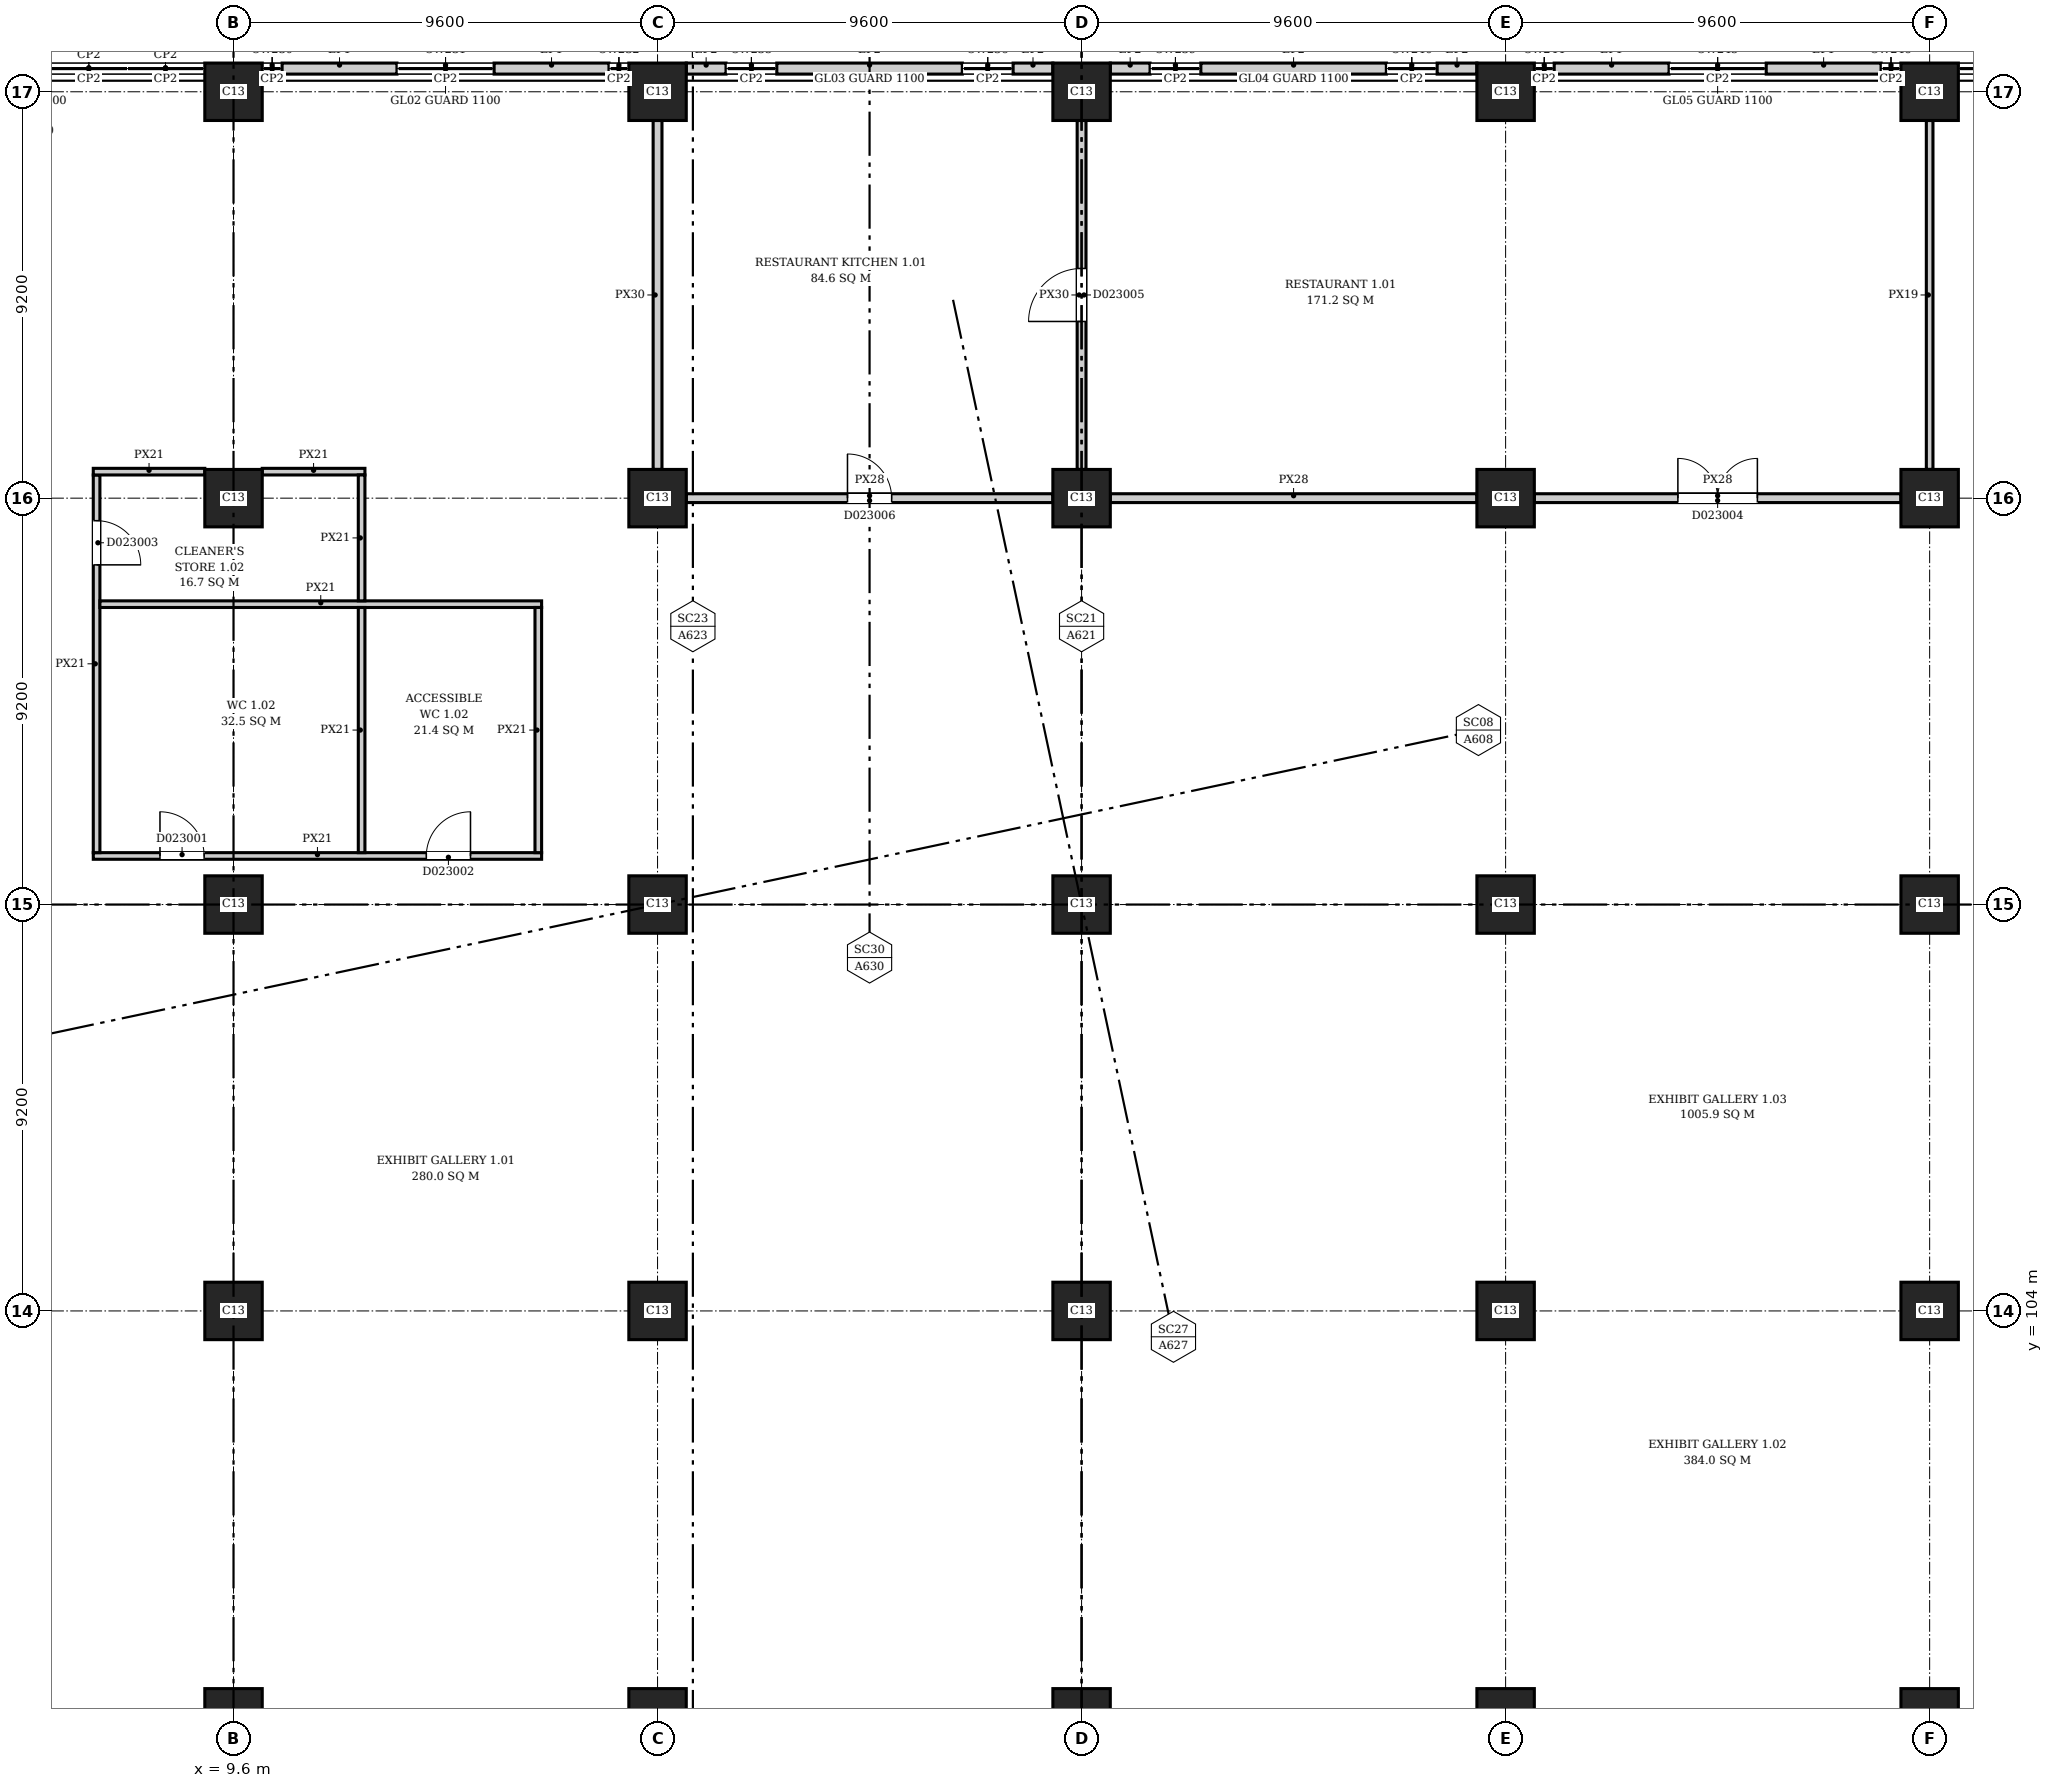
"""IFC4 building model, lengths in metres.
Left out: names, types, materials, properties, quantities, classifications, styles, units other than length and angle.
Written with IfcOpenShell. Run it as: python <this file> out.ifc"""

import sys

from ifc_helpers import new_model, si_unit, direction, frame, frame_2d, origin, origin_2d, place, context, subcontext, project, spatial, rectangle, extrude, element, fill, save


model = new_model("IFC4")
c1 = context("Model", 3, precision=1e-05, world=origin(), true_north=direction((0.0, 1.0)))
c2 = subcontext(c1, "Body", "Model", "MODEL_VIEW")
j1 = project(units=[si_unit("LENGTHUNIT", "METRE"), si_unit("PLANEANGLEUNIT", "RADIAN")], contexts=[c1])
p1 = place(None, origin())
s1 = spatial("IfcSite", under=j1, at=p1, CompositionType="ELEMENT")
p2 = place(p1, origin())
s2 = spatial("IfcBuilding", under=s1, at=p2, CompositionType="ELEMENT")
p3 = place(p2, frame((0.0, 0.0, 6.5)))
s3 = spatial("IfcBuildingStorey", under=s2, at=p3, CompositionType="ELEMENT", Elevation=6.5)
for number, where, z_axis, x_axis in (
    (1, (9.6, 94.8, 0.0), (0.0, 0.0, 1.0), (1.0, 0.0, 0.0)),
    (2, (19.2, 94.8, 0.0), (0.0, 0.0, 1.0), (1.0, 0.0, 0.0)),
    (3, (28.8, 94.8, 0.0), (0.0, 0.0, 1.0), (1.0, 0.0, 0.0)),
    (4, (38.4, 94.8, 0.0), (0.0, 0.0, 1.0), (1.0, 0.0, 0.0)),
    (5, (48.0, 94.8, 0.0), (0.0, 0.0, 1.0), (1.0, 0.0, 0.0)),
    (6, (9.6, 104.0, 0.0), (0.0, 0.0, 1.0), (1.0, 0.0, 0.0)),
    (7, (19.2, 104.0, 0.0), (0.0, 0.0, 1.0), (1.0, 0.0, 0.0)),
    (8, (28.8, 104.0, 0.0), (0.0, 0.0, 1.0), (1.0, 0.0, 0.0)),
    (9, (38.4, 104.0, 0.0), (0.0, 0.0, 1.0), (1.0, 0.0, 0.0)),
    (10, (48.0, 104.0, 0.0), (0.0, 0.0, 1.0), (1.0, 0.0, 0.0)),
    (11, (9.6, 113.2, 0.0), (0.0, 0.0, 1.0), (1.0, 0.0, 0.0)),
    (12, (19.2, 113.2, 0.0), (0.0, 0.0, 1.0), (1.0, 0.0, 0.0)),
    (13, (28.8, 113.2, 0.0), (0.0, 0.0, 1.0), (1.0, 0.0, 0.0)),
    (14, (38.4, 113.2, 0.0), (0.0, 0.0, 1.0), (1.0, 0.0, 0.0)),
    (15, (48.0, 113.2, 0.0), (0.0, 0.0, 1.0), (1.0, 0.0, 0.0)),
    (16, (9.6, 122.4, 0.0), (0.0, 0.0, 1.0), (1.0, 0.0, 0.0)),
    (17, (19.2, 122.4, 0.0), (0.0, 0.0, 1.0), (1.0, 0.0, 0.0)),
    (18, (28.8, 122.4, 0.0), (0.0, 0.0, 1.0), (1.0, 0.0, 0.0)),
    (19, (38.4, 122.4, 0.0), (0.0, 0.0, 1.0), (1.0, 0.0, 0.0)),
    (20, (48.0, 122.4, 0.0), (0.0, 0.0, 1.0), (1.0, 0.0, 0.0)),
    (21, (9.6, 131.6, 0.0), (0.0, 0.0, 1.0), (1.0, 0.0, 0.0)),
    (22, (19.2, 131.6, 0.0), (0.0, 0.0, 1.0), (1.0, 0.0, 0.0)),
    (23, (28.8, 131.6, 0.0), (0.0, 0.0, 1.0), (1.0, 0.0, 0.0)),
    (24, (38.4, 131.6, 0.0), (0.0, 0.0, 1.0), (1.0, 0.0, 0.0)),
    (25, (48.0, 131.6, 0.0), (0.0, 0.0, 1.0), (1.0, 0.0, 0.0)),
):
    element("IfcColumn", number, at=place(p3, frame(where, z_axis=z_axis, x_axis=x_axis)), inside=s3, PredefinedType="COLUMN", context=c2, shape_type="SweptSolid", body=[
        extrude(rectangle(XDim=1.3, YDim=1.3, at=origin_2d()), origin(), (0.0, 0.0, 1.0), 7.7),
    ])
for number, where, z_axis, x_axis in (
    (26, (13.3, 132.125, 0.0), (0.0, 0.0, 1.0), (-1.0, 0.0, 0.0)),
    (27, (18.1, 132.125, 0.0), (0.0, 0.0, 1.0), (-1.0, 0.0, 0.0)),
):
    element("IfcWall", number, at=place(p3, frame(where, z_axis=z_axis, x_axis=x_axis)), inside=s3, PredefinedType="ELEMENTEDWALL", context=c2, shape_type="SweptSolid", body=[
        extrude(rectangle(XDim=2.6, YDim=0.25, at=frame_2d((1.3, 0.0))), origin(), (0.0, 0.0, 1.0), 7.29),
    ])
p4 = place(p3, frame((20.75, 132.125, 0.0), z_axis=(0.0, 0.0, 1.0), x_axis=(-1.0, 0.0, 0.0)))
e28 = element("IfcWall", 28, at=p4, inside=s3, PredefinedType="ELEMENTEDWALL", context=c2, shape_type="SweptSolid", body=[
    extrude(rectangle(XDim=0.9, YDim=0.25, at=frame_2d((0.45, 0.0))), origin(), (0.0, 0.0, 1.0), 7.29),
])
p5 = place(p3, frame((26.1, 132.125, 0.0), z_axis=(0.0, 0.0, 1.0), x_axis=(-1.0, 0.0, 0.0)))
e29 = element("IfcWall", 29, at=p5, inside=s3, PredefinedType="ELEMENTEDWALL", context=c2, shape_type="SweptSolid", body=[
    extrude(rectangle(XDim=4.2, YDim=0.25, at=frame_2d((2.1, 0.0))), origin(), (0.0, 0.0, 1.0), 7.29),
])
p6 = place(p3, frame((28.15, 132.125, 0.0), z_axis=(0.0, 0.0, 1.0), x_axis=(-1.0, 0.0, 0.0)))
e30 = element("IfcWall", 30, at=p6, inside=s3, PredefinedType="ELEMENTEDWALL", context=c2, shape_type="SweptSolid", body=[
    extrude(rectangle(XDim=0.9, YDim=0.25, at=frame_2d((0.45, 0.0))), origin(), (0.0, 0.0, 1.0), 7.29),
])
p7 = place(p3, frame((30.35, 132.125, 0.0), z_axis=(0.0, 0.0, 1.0), x_axis=(-1.0, 0.0, 0.0)))
e31 = element("IfcWall", 31, at=p7, inside=s3, PredefinedType="ELEMENTEDWALL", context=c2, shape_type="SweptSolid", body=[
    extrude(rectangle(XDim=0.9, YDim=0.25, at=frame_2d((0.45, 0.0))), origin(), (0.0, 0.0, 1.0), 7.29),
])
p8 = place(p3, frame((35.7, 132.125, 0.0), z_axis=(0.0, 0.0, 1.0), x_axis=(-1.0, 0.0, 0.0)))
e32 = element("IfcWall", 32, at=p8, inside=s3, PredefinedType="ELEMENTEDWALL", context=c2, shape_type="SweptSolid", body=[
    extrude(rectangle(XDim=4.2, YDim=0.25, at=frame_2d((2.1, 0.0))), origin(), (0.0, 0.0, 1.0), 7.29),
])
p9 = place(p3, frame((37.75, 132.125, 0.0), z_axis=(0.0, 0.0, 1.0), x_axis=(-1.0, 0.0, 0.0)))
e33 = element("IfcWall", 33, at=p9, inside=s3, PredefinedType="ELEMENTEDWALL", context=c2, shape_type="SweptSolid", body=[
    extrude(rectangle(XDim=0.9, YDim=0.25, at=frame_2d((0.45, 0.0))), origin(), (0.0, 0.0, 1.0), 7.29),
])
p10 = place(p3, frame((42.1, 132.125, 0.0), z_axis=(0.0, 0.0, 1.0), x_axis=(-1.0, 0.0, 0.0)))
e34 = element("IfcWall", 34, at=p10, inside=s3, PredefinedType="ELEMENTEDWALL", context=c2, shape_type="SweptSolid", body=[
    extrude(rectangle(XDim=2.6, YDim=0.25, at=frame_2d((1.3, 0.0))), origin(), (0.0, 0.0, 1.0), 7.29),
])
p11 = place(p3, frame((46.9, 132.125, 0.0), z_axis=(0.0, 0.0, 1.0), x_axis=(-1.0, 0.0, 0.0)))
e35 = element("IfcWall", 35, at=p11, inside=s3, PredefinedType="ELEMENTEDWALL", context=c2, shape_type="SweptSolid", body=[
    extrude(rectangle(XDim=2.6, YDim=0.25, at=frame_2d((1.3, 0.0))), origin(), (0.0, 0.0, 1.0), 7.29),
])
p12 = place(p3, frame((6.425, 114.3, 0.0), z_axis=(0.0, 0.0, 1.0), x_axis=(1.0, 0.0, 0.0)))
e36 = element("IfcWall", 36, at=p12, inside=s3, PredefinedType="PARTITIONING", context=c2, shape_type="SweptSolid", body=[
    extrude(rectangle(XDim=10.15, YDim=0.15, at=frame_2d((5.075, 0.0))), origin(), (0.0, 0.0, 1.0), 7.29),
])
p13 = place(p12, frame((1.51, 0.0, 0.0)))
e37 = element("IfcOpeningElement", 37, at=p13, cuts=e36, PredefinedType="OPENING", context=c2, shape_type="SweptSolid", body=[
    extrude(rectangle(XDim=1.0, YDim=2.1, at=frame_2d((0.5, 1.05))), frame((0.0, 0.085, 0.0), z_axis=(0.0, -1.0, 0.0), x_axis=(1.0, 0.0, 0.0)), (0.0, 0.0, 1.0), 0.17),
])
p14 = place(p12, frame((7.54, 0.0, 0.0)))
e38 = element("IfcOpeningElement", 38, at=p14, cuts=e36, PredefinedType="OPENING", context=c2, shape_type="SweptSolid", body=[
    extrude(rectangle(XDim=1.0, YDim=2.1, at=frame_2d((0.5, 1.05))), frame((0.0, 0.085, 0.0), z_axis=(0.0, -1.0, 0.0), x_axis=(1.0, 0.0, 0.0)), (0.0, 0.0, 1.0), 0.17),
])
p15 = place(p3, frame((6.5, 114.375, 0.0), z_axis=(0.0, 0.0, 1.0), x_axis=(0.0, 1.0, 0.0)))
e39 = element("IfcWall", 39, at=p15, inside=s3, PredefinedType="PARTITIONING", context=c2, shape_type="SweptSolid", body=[
    extrude(rectangle(XDim=8.55, YDim=0.15, at=frame_2d((4.275, 0.0))), origin(), (0.0, 0.0, 1.0), 7.29),
])
p16 = place(p15, frame((6.515, 0.0, 0.0)))
e40 = element("IfcOpeningElement", 40, at=p16, cuts=e39, PredefinedType="OPENING", context=c2, shape_type="SweptSolid", body=[
    extrude(rectangle(XDim=1.0, YDim=2.1, at=frame_2d((0.5, 1.05))), frame((0.0, 0.085, 0.0), z_axis=(0.0, -1.0, 0.0), x_axis=(1.0, 0.0, 0.0)), (0.0, 0.0, 1.0), 0.17),
])
p17 = place(p3, frame((6.425, 123.0, 0.0), z_axis=(0.0, 0.0, 1.0), x_axis=(1.0, 0.0, 0.0)))
e41 = element("IfcWall", 41, at=p17, inside=s3, PredefinedType="PARTITIONING", context=c2, shape_type="SweptSolid", body=[
    extrude(rectangle(XDim=2.525, YDim=0.15, at=frame_2d((1.262, 0.0))), origin(), (0.0, 0.0, 1.0), 7.29),
])
p18 = place(p3, frame((6.575, 120.0, 0.0), z_axis=(0.0, 0.0, 1.0), x_axis=(1.0, 0.0, 0.0)))
e42 = element("IfcWall", 42, at=p18, inside=s3, PredefinedType="PARTITIONING", context=c2, shape_type="SweptSolid", body=[
    extrude(rectangle(XDim=10.0, YDim=0.15, at=frame_2d((5.0, 0.0))), origin(), (0.0, 0.0, 1.0), 7.29),
])
p19 = place(p3, frame((10.25, 123.0, 0.0), z_axis=(0.0, 0.0, 1.0), x_axis=(1.0, 0.0, 0.0)))
e43 = element("IfcWall", 43, at=p19, inside=s3, PredefinedType="PARTITIONING", context=c2, shape_type="SweptSolid", body=[
    extrude(rectangle(XDim=2.325, YDim=0.15, at=frame_2d((1.163, 0.0))), origin(), (0.0, 0.0, 1.0), 7.29),
])
p20 = place(p3, frame((12.5, 114.375, 0.0), z_axis=(0.0, 0.0, 1.0), x_axis=(0.0, 1.0, 0.0)))
e44 = element("IfcWall", 44, at=p20, inside=s3, PredefinedType="PARTITIONING", context=c2, shape_type="SweptSolid", body=[
    extrude(rectangle(XDim=5.55, YDim=0.15, at=frame_2d((2.775, 0.0))), origin(), (0.0, 0.0, 1.0), 7.29),
])
p21 = place(p3, frame((12.5, 120.075, 0.0), z_axis=(0.0, 0.0, 1.0), x_axis=(0.0, 1.0, 0.0)))
e45 = element("IfcWall", 45, at=p21, inside=s3, PredefinedType="PARTITIONING", context=c2, shape_type="SweptSolid", body=[
    extrude(rectangle(XDim=2.85, YDim=0.15, at=frame_2d((1.425, 0.0))), origin(), (0.0, 0.0, 1.0), 7.29),
])
p22 = place(p3, frame((16.5, 114.375, 0.0), z_axis=(0.0, 0.0, 1.0), x_axis=(0.0, 1.0, 0.0)))
e46 = element("IfcWall", 46, at=p22, inside=s3, PredefinedType="PARTITIONING", context=c2, shape_type="SweptSolid", body=[
    extrude(rectangle(XDim=5.55, YDim=0.15, at=frame_2d((2.775, 0.0))), origin(), (0.0, 0.0, 1.0), 7.29),
])
p23 = place(p3, frame((19.2, 123.05, 0.0), z_axis=(0.0, 0.0, 1.0), x_axis=(0.0, 1.0, 0.0)))
e47 = element("IfcWall", 47, at=p23, inside=s3, PredefinedType="PARTITIONING", context=c2, shape_type="SweptSolid", body=[
    extrude(rectangle(XDim=7.9, YDim=0.2, at=frame_2d((3.95, 0.0))), origin(), (0.0, 0.0, 1.0), 6.89),
])
p24 = place(p3, frame((19.85, 122.4, 0.0), z_axis=(0.0, 0.0, 1.0), x_axis=(1.0, 0.0, 0.0)))
e48 = element("IfcWall", 48, at=p24, inside=s3, PredefinedType="PARTITIONING", context=c2, shape_type="SweptSolid", body=[
    extrude(rectangle(XDim=8.3, YDim=0.2, at=frame_2d((4.15, 0.0))), origin(), (0.0, 0.0, 1.0), 6.29),
])
p25 = place(p24, frame((3.65, 0.0, 0.0)))
e49 = element("IfcOpeningElement", 49, at=p25, cuts=e48, PredefinedType="OPENING", context=c2, shape_type="SweptSolid", body=[
    extrude(rectangle(XDim=1.0, YDim=2.1, at=frame_2d((0.5, 1.05))), frame((0.0, 0.11, 0.0), z_axis=(0.0, -1.0, 0.0), x_axis=(1.0, 0.0, 0.0)), (0.0, 0.0, 1.0), 0.22),
])
p26 = place(p3, frame((28.8, 123.05, 0.0), z_axis=(0.0, 0.0, 1.0), x_axis=(0.0, 1.0, 0.0)))
e50 = element("IfcWall", 50, at=p26, inside=s3, PredefinedType="PARTITIONING", context=c2, shape_type="SweptSolid", body=[
    extrude(rectangle(XDim=7.9, YDim=0.2, at=frame_2d((3.95, 0.0))), origin(), (0.0, 0.0, 1.0), 6.89),
])
p27 = place(p26, frame((3.35, 0.0, 0.0)))
e51 = element("IfcOpeningElement", 51, at=p27, cuts=e50, PredefinedType="OPENING", context=c2, shape_type="SweptSolid", body=[
    extrude(rectangle(XDim=1.2, YDim=2.1, at=frame_2d((0.6, 1.05))), frame((0.0, 0.11, 0.0), z_axis=(0.0, -1.0, 0.0), x_axis=(1.0, 0.0, 0.0)), (0.0, 0.0, 1.0), 0.22),
])
p28 = place(p3, frame((29.45, 122.4, 0.0), z_axis=(0.0, 0.0, 1.0), x_axis=(1.0, 0.0, 0.0)))
e52 = element("IfcWall", 52, at=p28, inside=s3, PredefinedType="PARTITIONING", context=c2, shape_type="SweptSolid", body=[
    extrude(rectangle(XDim=8.3, YDim=0.2, at=frame_2d((4.15, 0.0))), origin(), (0.0, 0.0, 1.0), 6.29),
])
p29 = place(p3, frame((39.05, 122.4, 0.0), z_axis=(0.0, 0.0, 1.0), x_axis=(1.0, 0.0, 0.0)))
e53 = element("IfcWall", 53, at=p29, inside=s3, PredefinedType="PARTITIONING", context=c2, shape_type="SweptSolid", body=[
    extrude(rectangle(XDim=8.3, YDim=0.2, at=frame_2d((4.15, 0.0))), origin(), (0.0, 0.0, 1.0), 6.29),
])
p30 = place(p29, frame((3.25, 0.0, 0.0)))
e54 = element("IfcOpeningElement", 54, at=p30, cuts=e53, PredefinedType="OPENING", context=c2, shape_type="SweptSolid", body=[
    extrude(rectangle(XDim=1.8, YDim=2.1, at=frame_2d((0.9, 1.05))), frame((0.0, 0.11, 0.0), z_axis=(0.0, -1.0, 0.0), x_axis=(1.0, 0.0, 0.0)), (0.0, 0.0, 1.0), 0.22),
])
p31 = place(p3, frame((48.0, 123.05, 0.0), z_axis=(0.0, 0.0, 1.0), x_axis=(0.0, 1.0, 0.0)))
e55 = element("IfcWall", 55, at=p31, inside=s3, PredefinedType="PARTITIONING", context=c2, shape_type="SweptSolid", body=[
    extrude(rectangle(XDim=7.9, YDim=0.15, at=frame_2d((3.95, 0.0))), origin(), (0.0, 0.0, 1.0), 6.89),
])
p32 = place(p13, origin())
e56 = element("IfcDoor", 56, at=p32, inside=s3, OperationType="SINGLE_SWING_LEFT", PredefinedType="DOOR", context=c2, shape_type="SweptSolid", body=[
    extrude(rectangle(XDim=1.0, YDim=2.1, at=frame_2d((0.5, 1.05))), frame((0.0, 0.025, 0.0), z_axis=(0.0, -1.0, 0.0), x_axis=(1.0, 0.0, 0.0)), (0.0, 0.0, 1.0), 0.05),
])
fill(e37, e56)
p33 = place(p14, origin())
e57 = element("IfcDoor", 57, at=p33, inside=s3, OperationType="SINGLE_SWING_RIGHT", PredefinedType="DOOR", context=c2, shape_type="SweptSolid", body=[
    extrude(rectangle(XDim=1.0, YDim=2.1, at=frame_2d((0.5, 1.05))), frame((0.0, 0.025, 0.0), z_axis=(0.0, -1.0, 0.0), x_axis=(1.0, 0.0, 0.0)), (0.0, 0.0, 1.0), 0.05),
])
fill(e38, e57)
p34 = place(p16, origin())
e58 = element("IfcDoor", 58, at=p34, inside=s3, OperationType="SINGLE_SWING_LEFT", PredefinedType="DOOR", context=c2, shape_type="SweptSolid", body=[
    extrude(rectangle(XDim=1.0, YDim=2.1, at=frame_2d((0.5, 1.05))), frame((0.0, 0.025, 0.0), z_axis=(0.0, -1.0, 0.0), x_axis=(1.0, 0.0, 0.0)), (0.0, 0.0, 1.0), 0.05),
])
fill(e40, e58)
p35 = place(p30, origin())
e59 = element("IfcDoor", 59, at=p35, inside=s3, OperationType="DOUBLE_DOOR_SINGLE_SWING", PredefinedType="DOOR", context=c2, shape_type="SweptSolid", body=[
    extrude(rectangle(XDim=1.8, YDim=2.1, at=frame_2d((0.9, 1.05))), frame((0.0, 0.025, 0.0), z_axis=(0.0, -1.0, 0.0), x_axis=(1.0, 0.0, 0.0)), (0.0, 0.0, 1.0), 0.05),
])
fill(e54, e59)
p36 = place(p27, origin())
e60 = element("IfcDoor", 60, at=p36, inside=s3, OperationType="SINGLE_SWING_LEFT", PredefinedType="DOOR", context=c2, shape_type="SweptSolid", body=[
    extrude(rectangle(XDim=1.2, YDim=2.1, at=frame_2d((0.6, 1.05))), frame((0.0, 0.025, 0.0), z_axis=(0.0, -1.0, 0.0), x_axis=(1.0, 0.0, 0.0)), (0.0, 0.0, 1.0), 0.05),
])
fill(e51, e60)
p37 = place(p25, origin())
e61 = element("IfcDoor", 61, at=p37, inside=s3, OperationType="SINGLE_SWING_LEFT", PredefinedType="DOOR", context=c2, shape_type="SweptSolid", body=[
    extrude(rectangle(XDim=1.0, YDim=2.1, at=frame_2d((0.5, 1.05))), frame((0.0, 0.025, 0.0), z_axis=(0.0, -1.0, 0.0), x_axis=(1.0, 0.0, 0.0)), (0.0, 0.0, 1.0), 0.05),
])
fill(e49, e61)
save(model, sys.argv[1])
